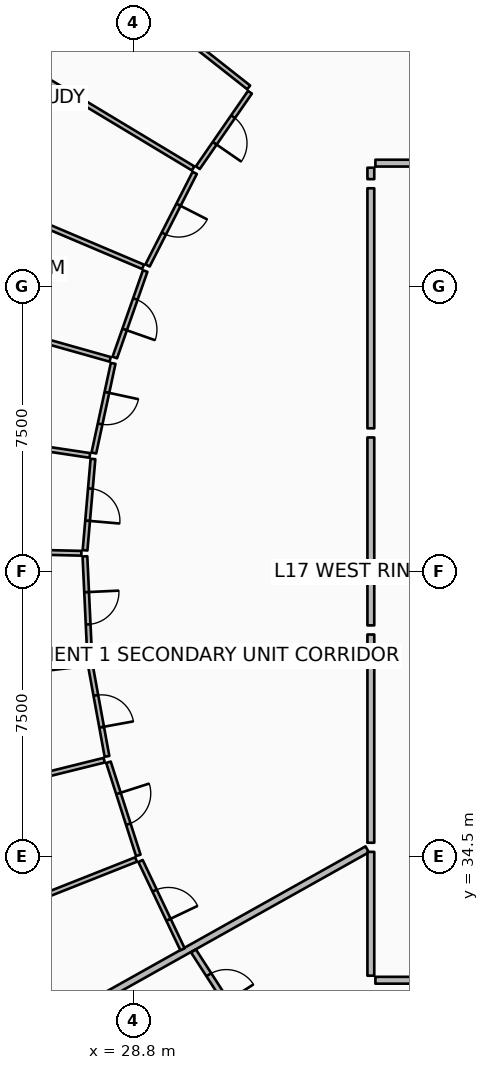
"""IFC4 building model, lengths in metres.
Left out: names, types, materials, properties, quantities, classifications, styles, units other than length and angle.
Written with IfcOpenShell. Run it as: python <this file> out.ifc"""

import sys

from ifc_helpers import new_model, si_unit, direction, frame, frame_2d, origin, place, context, subcontext, project, spatial, rectangle, extrude, element, fill, save


model = new_model("IFC4")
c1 = context("Model", 3, precision=1e-05, world=origin(), true_north=direction((0.0, 1.0)))
c2 = subcontext(c1, "Body", "Model", "MODEL_VIEW")
j1 = project(units=[si_unit("LENGTHUNIT", "METRE"), si_unit("PLANEANGLEUNIT", "RADIAN")], contexts=[c1])
p1 = place(None, origin())
s1 = spatial("IfcSite", under=j1, at=p1, CompositionType="ELEMENT")
p2 = place(p1, origin())
s2 = spatial("IfcBuilding", under=s1, at=p2, CompositionType="ELEMENT")
p3 = place(p2, frame((0.0, 0.0, 71.4)))
s3 = spatial("IfcBuildingStorey", under=s2, at=p3, CompositionType="ELEMENT", Elevation=71.4)
p4 = place(p3, frame((34.954, 34.694, 0.0), z_axis=(0.0, 0.0, 1.0), x_axis=(-0.872493465611, -0.488625779577, 0.0)))
e1 = element("IfcWall", 1, at=p4, inside=s3, PredefinedType="PARTITIONING", context=c2, shape_type="SweptSolid", body=[
    extrude(rectangle(XDim=16.586, YDim=0.18, at=frame_2d((8.293, 0.0))), origin(), (0.0, 0.0, 1.0), 2.307),
])
p5 = place(p3, frame((41.86, 52.75, 0.0), z_axis=(0.0, 0.0, 1.0), x_axis=(-1.0, 0.0, 0.0)))
e2 = element("IfcWall", 2, at=p5, inside=s3, PredefinedType="PARTITIONING", context=c2, shape_type="SweptSolid", body=[
    extrude(rectangle(XDim=6.69, YDim=0.18, at=frame_2d((3.345, 0.0))), origin(), (0.0, 0.0, 1.0), 2.307),
])
p6 = place(p5, frame((2.795, 0.0, 0.0)))
e3 = element("IfcOpeningElement", 3, at=p6, cuts=e2, PredefinedType="OPENING", context=c2, shape_type="SweptSolid", body=[
    extrude(rectangle(XDim=1.1, YDim=2.1, at=frame_2d((0.55, 1.05))), frame((0.0, 0.1, 0.0), z_axis=(0.0, -1.0, 0.0), x_axis=(1.0, 0.0, 0.0)), (0.0, 0.0, 1.0), 0.2),
])
p7 = place(p3, frame((35.05, 52.63, 0.0), z_axis=(0.0, 0.0, 1.0), x_axis=(0.0, -1.0, 0.0)))
e4 = element("IfcWall", 4, at=p7, inside=s3, PredefinedType="PARTITIONING", context=c2, shape_type="SweptSolid", body=[
    extrude(rectangle(XDim=0.301, YDim=0.18, at=frame_2d((0.15, 0.0))), origin(), (0.0, 0.0, 1.0), 2.307),
])
p8 = place(p3, frame((35.05, 52.089, 0.0), z_axis=(0.0, 0.0, 1.0), x_axis=(0.0, -1.0, 0.0)))
e5 = element("IfcWall", 5, at=p8, inside=s3, PredefinedType="PARTITIONING", context=c2, shape_type="SweptSolid", body=[
    extrude(rectangle(XDim=6.317, YDim=0.18, at=frame_2d((3.158, 0.0))), origin(), (0.0, 0.0, 1.0), 2.307),
])
p9 = place(p3, frame((31.836, 54.743, 0.0), z_axis=(0.0, 0.0, 1.0), x_axis=(-0.785333171854, 0.619073347178, 0.0)))
e6 = element("IfcWall", 6, at=p9, inside=s3, PredefinedType="PARTITIONING", context=c2, shape_type="SweptSolid", body=[
    extrude(rectangle(XDim=7.489, YDim=0.125, at=frame_2d((3.745, 0.0))), origin(), (0.0, 0.0, 1.0), 2.307),
])
p10 = place(p3, frame((30.375, 52.611, 0.0), z_axis=(0.0, 0.0, 1.0), x_axis=(-0.856697740307, 0.515818748936, 0.0)))
e7 = element("IfcWall", 7, at=p10, inside=s3, PredefinedType="PARTITIONING", context=c2, shape_type="SweptSolid", body=[
    extrude(rectangle(XDim=7.704, YDim=0.125, at=frame_2d((3.852, 0.0))), origin(), (0.0, 0.0, 1.0), 2.325),
])
p11 = place(p3, frame((29.055, 50.022, 0.0), z_axis=(0.0, 0.0, 1.0), x_axis=(-0.920841617163, 0.389936810395, 0.0)))
e8 = element("IfcWall", 8, at=p11, inside=s3, PredefinedType="PARTITIONING", context=c2, shape_type="SweptSolid", body=[
    extrude(rectangle(XDim=8.613, YDim=0.125, at=frame_2d((4.306, 0.0))), origin(), (0.0, 0.0, 1.0), 2.325),
])
p12 = place(p3, frame((31.869, 54.615, 0.0), z_axis=(0.0, 0.0, 1.0), x_axis=(-0.568588801709, -0.822621890404, 0.0)))
e9 = element("IfcWall", 9, at=p12, inside=s3, PredefinedType="PARTITIONING", context=c2, shape_type="SweptSolid", body=[
    extrude(rectangle(XDim=2.412, YDim=0.125, at=frame_2d((1.206, 0.0))), origin(), (0.0, 0.0, 1.0), 2.307),
])
p13 = place(p12, frame((0.781, 0.0, 0.0)))
e10 = element("IfcOpeningElement", 10, at=p13, cuts=e9, PredefinedType="OPENING", context=c2, shape_type="SweptSolid", body=[
    extrude(rectangle(XDim=0.85, YDim=2.06, at=frame_2d((0.425, 1.03))), frame((0.0, 0.073, 0.0), z_axis=(0.0, -1.0, 0.0), x_axis=(1.0, 0.0, 0.0)), (0.0, 0.0, 1.0), 0.145),
])
p14 = place(p3, frame((30.416, 52.493, 0.0), z_axis=(0.0, 0.0, 1.0), x_axis=(-0.454024795493, -0.890989048798, 0.0)))
e11 = element("IfcWall", 11, at=p14, inside=s3, PredefinedType="PARTITIONING", context=c2, shape_type="SweptSolid", body=[
    extrude(rectangle(XDim=2.733, YDim=0.125, at=frame_2d((1.367, 0.0))), origin(), (0.0, 0.0, 1.0), 2.79),
])
p15 = place(p14, frame((0.942, 0.0, 0.0)))
e12 = element("IfcOpeningElement", 12, at=p15, cuts=e11, PredefinedType="OPENING", context=c2, shape_type="SweptSolid", body=[
    extrude(rectangle(XDim=0.85, YDim=2.06, at=frame_2d((0.425, 1.03))), frame((0.0, 0.073, 0.0), z_axis=(0.0, -1.0, 0.0), x_axis=(1.0, 0.0, 0.0)), (0.0, 0.0, 1.0), 0.145),
])
p16 = place(p3, frame((29.112, 49.911, 0.0), z_axis=(0.0, 0.0, 1.0), x_axis=(-0.331369117911, -0.943501196446, 0.0)))
e13 = element("IfcWall", 13, at=p16, inside=s3, PredefinedType="PARTITIONING", context=c2, shape_type="SweptSolid", body=[
    extrude(rectangle(XDim=2.412, YDim=0.125, at=frame_2d((1.206, 0.0))), origin(), (0.0, 0.0, 1.0), 2.307),
])
p17 = place(p16, frame((0.781, 0.0, 0.0)))
e14 = element("IfcOpeningElement", 14, at=p17, cuts=e13, PredefinedType="OPENING", context=c2, shape_type="SweptSolid", body=[
    extrude(rectangle(XDim=0.85, YDim=2.06, at=frame_2d((0.425, 1.03))), frame((0.0, 0.073, 0.0), z_axis=(0.0, -1.0, 0.0), x_axis=(1.0, 0.0, 0.0)), (0.0, 0.0, 1.0), 0.145),
])
p18 = place(p3, frame((35.05, 45.532, 0.0), z_axis=(0.0, 0.0, 1.0), x_axis=(0.0, -1.0, 0.0)))
e15 = element("IfcWall", 15, at=p18, inside=s3, PredefinedType="PARTITIONING", context=c2, shape_type="SweptSolid", body=[
    extrude(rectangle(XDim=4.945, YDim=0.18, at=frame_2d((2.472, 0.0))), origin(), (0.0, 0.0, 1.0), 2.307),
])
p19 = place(p3, frame((28.19, 47.587, 0.0), z_axis=(0.0, 0.0, 1.0), x_axis=(-0.962452458747, 0.271450298675, 0.0)))
e16 = element("IfcWall", 16, at=p19, inside=s3, PredefinedType="PARTITIONING", context=c2, shape_type="SweptSolid", body=[
    extrude(rectangle(XDim=9.991, YDim=0.125, at=frame_2d((4.996, 0.0))), origin(), (0.0, 0.0, 1.0), 2.307),
])
p20 = place(p3, frame((27.656, 45.059, 0.0), z_axis=(0.0, 0.0, 1.0), x_axis=(-0.988887175004, 0.148667935725, 0.0)))
e17 = element("IfcWall", 17, at=p20, inside=s3, PredefinedType="PARTITIONING", context=c2, shape_type="SweptSolid", body=[
    extrude(rectangle(XDim=10.098, YDim=0.125, at=frame_2d((5.049, 0.0))), origin(), (0.0, 0.0, 1.0), 2.325),
])
p21 = place(p3, frame((27.433, 42.485, 0.0), z_axis=(0.0, 0.0, 1.0), x_axis=(-0.999722212563, 0.023568998875, 0.0)))
e18 = element("IfcWall", 18, at=p21, inside=s3, PredefinedType="PARTITIONING", context=c2, shape_type="SweptSolid", body=[
    extrude(rectangle(XDim=10.586, YDim=0.125, at=frame_2d((5.293, 0.0))), origin(), (0.0, 0.0, 1.0), 2.325),
])
p22 = place(p3, frame((28.269, 47.482, 0.0), z_axis=(0.0, 0.0, 1.0), x_axis=(-0.210517386484, -0.977590113487, 0.0)))
e19 = element("IfcWall", 19, at=p22, inside=s3, PredefinedType="PARTITIONING", context=c2, shape_type="SweptSolid", body=[
    extrude(rectangle(XDim=2.412, YDim=0.125, at=frame_2d((1.206, 0.0))), origin(), (0.0, 0.0, 1.0), 2.307),
])
p23 = place(p22, frame((0.781, 0.0, 0.0)))
e20 = element("IfcOpeningElement", 20, at=p23, cuts=e19, PredefinedType="OPENING", context=c2, shape_type="SweptSolid", body=[
    extrude(rectangle(XDim=0.85, YDim=2.06, at=frame_2d((0.425, 1.03))), frame((0.0, 0.073, 0.0), z_axis=(0.0, -1.0, 0.0), x_axis=(1.0, 0.0, 0.0)), (0.0, 0.0, 1.0), 0.145),
])
p24 = place(p3, frame((27.738, 44.966, 0.0), z_axis=(0.0, 0.0, 1.0), x_axis=(-0.086328274509, -0.996266745917, 0.0)))
e21 = element("IfcWall", 21, at=p24, inside=s3, PredefinedType="PARTITIONING", context=c2, shape_type="SweptSolid", body=[
    extrude(rectangle(XDim=2.412, YDim=0.125, at=frame_2d((1.206, 0.0))), origin(), (0.0, 0.0, 1.0), 2.79),
])
p25 = place(p24, frame((0.781, 0.0, 0.0)))
e22 = element("IfcOpeningElement", 22, at=p25, cuts=e21, PredefinedType="OPENING", context=c2, shape_type="SweptSolid", body=[
    extrude(rectangle(XDim=0.85, YDim=2.06, at=frame_2d((0.425, 1.03))), frame((0.0, 0.073, 0.0), z_axis=(0.0, -1.0, 0.0), x_axis=(1.0, 0.0, 0.0)), (0.0, 0.0, 1.0), 0.145),
])
p26 = place(p3, frame((27.527, 42.403, 0.0), z_axis=(0.0, 0.0, 1.0), x_axis=(0.047072860468, -0.998891458472, 0.0)))
e23 = element("IfcWall", 23, at=p26, inside=s3, PredefinedType="PARTITIONING", context=c2, shape_type="SweptSolid", body=[
    extrude(rectangle(XDim=2.733, YDim=0.125, at=frame_2d((1.367, 0.0))), origin(), (0.0, 0.0, 1.0), 2.307),
])
p27 = place(p26, frame((0.942, 0.0, 0.0)))
e24 = element("IfcOpeningElement", 24, at=p27, cuts=e23, PredefinedType="OPENING", context=c2, shape_type="SweptSolid", body=[
    extrude(rectangle(XDim=0.85, YDim=2.06, at=frame_2d((0.425, 1.03))), frame((0.0, 0.073, 0.0), z_axis=(0.0, -1.0, 0.0), x_axis=(1.0, 0.0, 0.0)), (0.0, 0.0, 1.0), 0.145),
])
p28 = place(p3, frame((35.05, 40.347, 0.0), z_axis=(0.0, 0.0, 1.0), x_axis=(0.0, -1.0, 0.0)))
e25 = element("IfcWall", 25, at=p28, inside=s3, PredefinedType="PARTITIONING", context=c2, shape_type="SweptSolid", body=[
    extrude(rectangle(XDim=5.48, YDim=0.18, at=frame_2d((2.74, 0.0))), origin(), (0.0, 0.0, 1.0), 2.307),
])
p29 = place(p3, frame((27.56, 39.581, 0.0), z_axis=(0.0, 0.0, 1.0), x_axis=(-0.993067148518, -0.117548451854, 0.0)))
e26 = element("IfcWall", 26, at=p29, inside=s3, PredefinedType="PARTITIONING", context=c2, shape_type="SweptSolid", body=[
    extrude(rectangle(XDim=10.956, YDim=0.125, at=frame_2d((5.478, 0.0))), origin(), (0.0, 0.0, 1.0), 2.307),
])
p30 = place(p3, frame((28.034, 37.04, 0.0), z_axis=(0.0, 0.0, 1.0), x_axis=(-0.970510155377, -0.241060237928, 0.0)))
e27 = element("IfcWall", 27, at=p30, inside=s3, PredefinedType="PARTITIONING", context=c2, shape_type="SweptSolid", body=[
    extrude(rectangle(XDim=10.437, YDim=0.125, at=frame_2d((5.218, 0.0))), origin(), (0.0, 0.0, 1.0), 2.325),
])
p31 = place(p3, frame((28.872, 34.427, 0.0), z_axis=(0.0, 0.0, 1.0), x_axis=(-0.929776542834, -0.368124408855, 0.0)))
e28 = element("IfcWall", 28, at=p31, inside=s3, PredefinedType="PARTITIONING", context=c2, shape_type="SweptSolid", body=[
    extrude(rectangle(XDim=10.42, YDim=0.125, at=frame_2d((5.21, 0.0))), origin(), (0.0, 0.0, 1.0), 2.325),
])
p32 = place(p3, frame((27.673, 39.514, 0.0), z_axis=(0.0, 0.0, 1.0), x_axis=(0.179642413558, -0.983731977345, 0.0)))
e29 = element("IfcWall", 29, at=p32, inside=s3, PredefinedType="PARTITIONING", context=c2, shape_type="SweptSolid", body=[
    extrude(rectangle(XDim=2.412, YDim=0.125, at=frame_2d((1.206, 0.0))), origin(), (0.0, 0.0, 1.0), 2.307),
])
p33 = place(p32, frame((0.781, 0.0, 0.0)))
e30 = element("IfcOpeningElement", 30, at=p33, cuts=e29, PredefinedType="OPENING", context=c2, shape_type="SweptSolid", body=[
    extrude(rectangle(XDim=0.85, YDim=2.06, at=frame_2d((0.425, 1.03))), frame((0.0, 0.073, 0.0), z_axis=(0.0, -1.0, 0.0), x_axis=(1.0, 0.0, 0.0)), (0.0, 0.0, 1.0), 0.145),
])
p34 = place(p3, frame((28.146, 36.986, 0.0), z_axis=(0.0, 0.0, 1.0), x_axis=(0.305274947668, -0.952264252362, 0.0)))
e31 = element("IfcWall", 31, at=p34, inside=s3, PredefinedType="PARTITIONING", context=c2, shape_type="SweptSolid", body=[
    extrude(rectangle(XDim=2.573, YDim=0.125, at=frame_2d((1.286, 0.0))), origin(), (0.0, 0.0, 1.0), 2.79),
])
p35 = place(p34, frame((0.861, 0.0, 0.0)))
e32 = element("IfcOpeningElement", 32, at=p35, cuts=e31, PredefinedType="OPENING", context=c2, shape_type="SweptSolid", body=[
    extrude(rectangle(XDim=0.85, YDim=2.06, at=frame_2d((0.425, 1.03))), frame((0.0, 0.073, 0.0), z_axis=(0.0, -1.0, 0.0), x_axis=(1.0, 0.0, 0.0)), (0.0, 0.0, 1.0), 0.145),
])
p36 = place(p3, frame((28.99, 34.387, 0.0), z_axis=(0.0, 0.0, 1.0), x_axis=(0.429399392499, -0.903114700202, 0.0)))
e33 = element("IfcWall", 33, at=p36, inside=s3, PredefinedType="PARTITIONING", context=c2, shape_type="SweptSolid", body=[
    extrude(rectangle(XDim=2.573, YDim=0.125, at=frame_2d((1.286, 0.0))), origin(), (0.0, 0.0, 1.0), 2.307),
])
p37 = place(p36, frame((0.861, 0.0, 0.0)))
e34 = element("IfcOpeningElement", 34, at=p37, cuts=e33, PredefinedType="OPENING", context=c2, shape_type="SweptSolid", body=[
    extrude(rectangle(XDim=0.85, YDim=2.06, at=frame_2d((0.425, 1.03))), frame((0.0, 0.073, 0.0), z_axis=(0.0, -1.0, 0.0), x_axis=(1.0, 0.0, 0.0)), (0.0, 0.0, 1.0), 0.145),
])
p38 = place(p3, frame((35.05, 34.628, 0.0), z_axis=(0.0, 0.0, 1.0), x_axis=(0.0, -1.0, 0.0)))
e35 = element("IfcWall", 35, at=p38, inside=s3, PredefinedType="PARTITIONING", context=c2, shape_type="SweptSolid", body=[
    extrude(rectangle(XDim=3.258, YDim=0.18, at=frame_2d((1.629, 0.0))), origin(), (0.0, 0.0, 1.0), 2.307),
])
p39 = place(p3, frame((35.17, 31.25, 0.0), z_axis=(0.0, 0.0, 1.0), x_axis=(1.0, 0.0, 0.0)))
e36 = element("IfcWall", 36, at=p39, inside=s3, PredefinedType="PARTITIONING", context=c2, shape_type="SweptSolid", body=[
    extrude(rectangle(XDim=4.236, YDim=0.18, at=frame_2d((2.118, 0.0))), origin(), (0.0, 0.0, 1.0), 2.307),
])
p40 = place(p3, frame((30.384, 32.02, 0.0), z_axis=(0.0, 0.0, 1.0), x_axis=(0.542055500246, -0.84034268882, 0.0)))
e37 = element("IfcWall", 37, at=p40, inside=s3, PredefinedType="PARTITIONING", context=c2, shape_type="SweptSolid", body=[
    extrude(rectangle(XDim=2.338, YDim=0.15, at=frame_2d((1.169, 0.0))), origin(), (0.0, 0.0, 1.0), 2.307),
])
p41 = place(p40, frame((0.744, 0.0, 0.0)))
e38 = element("IfcOpeningElement", 38, at=p41, cuts=e37, PredefinedType="OPENING", context=c2, shape_type="SweptSolid", body=[
    extrude(rectangle(XDim=0.85, YDim=2.06, at=frame_2d((0.425, 1.03))), frame((0.0, 0.085, 0.0), z_axis=(0.0, -1.0, 0.0), x_axis=(1.0, 0.0, 0.0)), (0.0, 0.0, 1.0), 0.17),
])
p42 = place(p13, origin())
e39 = element("IfcDoor", 39, at=p42, inside=s3, OperationType="SINGLE_SWING_RIGHT", PredefinedType="DOOR", context=c2, shape_type="SweptSolid", body=[
    extrude(rectangle(XDim=0.85, YDim=2.06, at=frame_2d((0.425, 1.03))), frame((0.0, 0.025, 0.0), z_axis=(0.0, -1.0, 0.0), x_axis=(1.0, 0.0, 0.0)), (0.0, 0.0, 1.0), 0.05),
])
fill(e10, e39)
p43 = place(p15, origin())
e40 = element("IfcDoor", 40, at=p43, inside=s3, OperationType="SINGLE_SWING_LEFT", PredefinedType="DOOR", context=c2, shape_type="SweptSolid", body=[
    extrude(rectangle(XDim=0.85, YDim=2.06, at=frame_2d((0.425, 1.03))), frame((0.0, 0.025, 0.0), z_axis=(0.0, -1.0, 0.0), x_axis=(1.0, 0.0, 0.0)), (0.0, 0.0, 1.0), 0.05),
])
fill(e12, e40)
p44 = place(p17, origin())
e41 = element("IfcDoor", 41, at=p44, inside=s3, OperationType="SINGLE_SWING_RIGHT", PredefinedType="DOOR", context=c2, shape_type="SweptSolid", body=[
    extrude(rectangle(XDim=0.85, YDim=2.06, at=frame_2d((0.425, 1.03))), frame((0.0, 0.025, 0.0), z_axis=(0.0, -1.0, 0.0), x_axis=(1.0, 0.0, 0.0)), (0.0, 0.0, 1.0), 0.05),
])
fill(e14, e41)
p45 = place(p23, origin())
e42 = element("IfcDoor", 42, at=p45, inside=s3, OperationType="SINGLE_SWING_LEFT", PredefinedType="DOOR", context=c2, shape_type="SweptSolid", body=[
    extrude(rectangle(XDim=0.85, YDim=2.06, at=frame_2d((0.425, 1.03))), frame((0.0, 0.025, 0.0), z_axis=(0.0, -1.0, 0.0), x_axis=(1.0, 0.0, 0.0)), (0.0, 0.0, 1.0), 0.05),
])
fill(e20, e42)
p46 = place(p25, origin())
e43 = element("IfcDoor", 43, at=p46, inside=s3, OperationType="SINGLE_SWING_RIGHT", PredefinedType="DOOR", context=c2, shape_type="SweptSolid", body=[
    extrude(rectangle(XDim=0.85, YDim=2.06, at=frame_2d((0.425, 1.03))), frame((0.0, 0.025, 0.0), z_axis=(0.0, -1.0, 0.0), x_axis=(1.0, 0.0, 0.0)), (0.0, 0.0, 1.0), 0.05),
])
fill(e22, e43)
p47 = place(p27, origin())
e44 = element("IfcDoor", 44, at=p47, inside=s3, OperationType="SINGLE_SWING_LEFT", PredefinedType="DOOR", context=c2, shape_type="SweptSolid", body=[
    extrude(rectangle(XDim=0.85, YDim=2.06, at=frame_2d((0.425, 1.03))), frame((0.0, 0.025, 0.0), z_axis=(0.0, -1.0, 0.0), x_axis=(1.0, 0.0, 0.0)), (0.0, 0.0, 1.0), 0.05),
])
fill(e24, e44)
p48 = place(p33, origin())
e45 = element("IfcDoor", 45, at=p48, inside=s3, OperationType="SINGLE_SWING_RIGHT", PredefinedType="DOOR", context=c2, shape_type="SweptSolid", body=[
    extrude(rectangle(XDim=0.85, YDim=2.06, at=frame_2d((0.425, 1.03))), frame((0.0, 0.025, 0.0), z_axis=(0.0, -1.0, 0.0), x_axis=(1.0, 0.0, 0.0)), (0.0, 0.0, 1.0), 0.05),
])
fill(e30, e45)
p49 = place(p35, origin())
e46 = element("IfcDoor", 46, at=p49, inside=s3, OperationType="SINGLE_SWING_LEFT", PredefinedType="DOOR", context=c2, shape_type="SweptSolid", body=[
    extrude(rectangle(XDim=0.85, YDim=2.06, at=frame_2d((0.425, 1.03))), frame((0.0, 0.025, 0.0), z_axis=(0.0, -1.0, 0.0), x_axis=(1.0, 0.0, 0.0)), (0.0, 0.0, 1.0), 0.05),
])
fill(e32, e46)
p50 = place(p37, origin())
e47 = element("IfcDoor", 47, at=p50, inside=s3, OperationType="SINGLE_SWING_RIGHT", PredefinedType="DOOR", context=c2, shape_type="SweptSolid", body=[
    extrude(rectangle(XDim=0.85, YDim=2.06, at=frame_2d((0.425, 1.03))), frame((0.0, 0.025, 0.0), z_axis=(0.0, -1.0, 0.0), x_axis=(1.0, 0.0, 0.0)), (0.0, 0.0, 1.0), 0.05),
])
fill(e34, e47)
p51 = place(p41, origin())
e48 = element("IfcDoor", 48, at=p51, inside=s3, OperationType="SINGLE_SWING_RIGHT", PredefinedType="DOOR", context=c2, shape_type="SweptSolid", body=[
    extrude(rectangle(XDim=0.85, YDim=2.06, at=frame_2d((0.425, 1.03))), frame((0.0, 0.025, 0.0), z_axis=(0.0, -1.0, 0.0), x_axis=(1.0, 0.0, 0.0)), (0.0, 0.0, 1.0), 0.05),
])
fill(e38, e48)
save(model, sys.argv[1])
